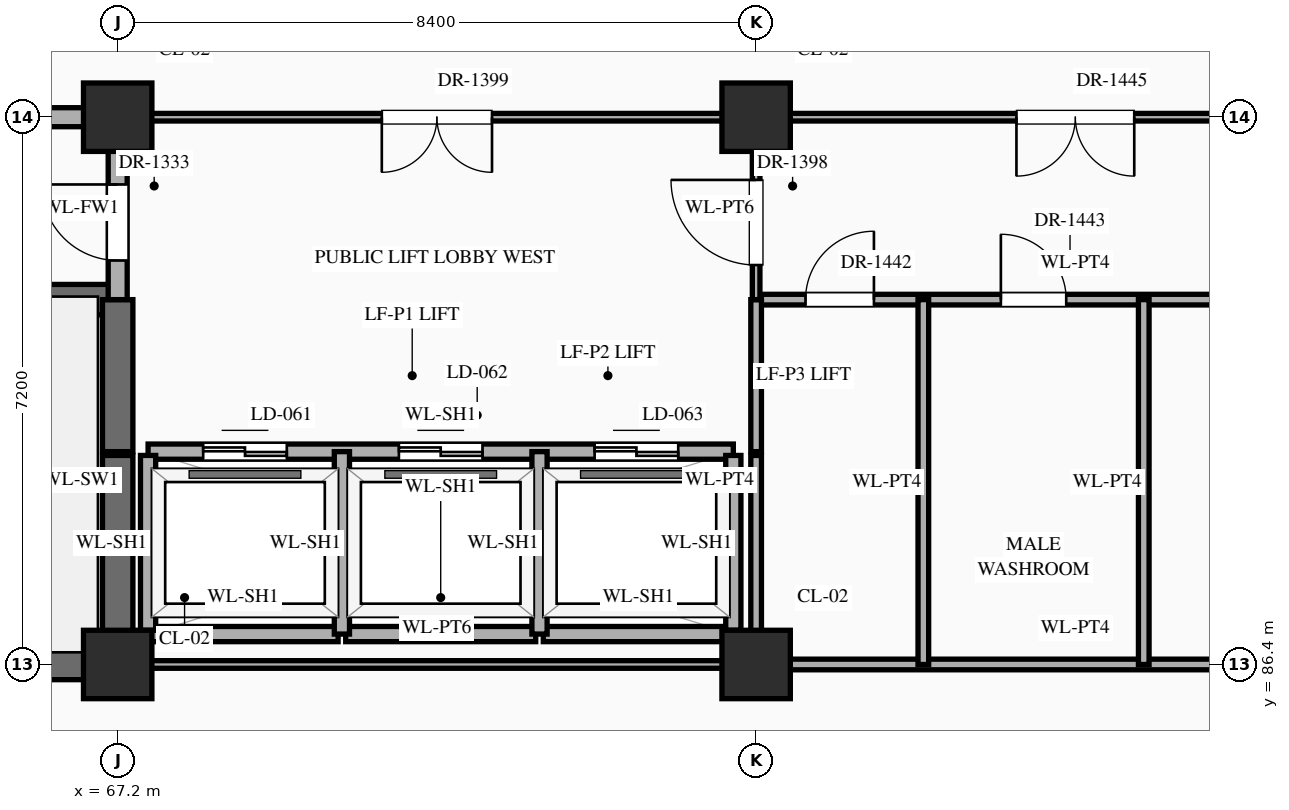
"""IFC4 building model, lengths in metres.
Left out: names, types, materials, properties, quantities, classifications, styles, units other than length and angle.
Written with IfcOpenShell. Run it as: python <this file> out.ifc"""

import sys

from ifc_helpers import new_model, si_unit, direction, frame, frame_2d, origin, origin_2d, place, context, subcontext, project, spatial, rectangle, extrude, element, fill, save


model = new_model("IFC4")
c1 = context("Model", 3, precision=1e-05, world=origin(), true_north=direction((0.0, 1.0)))
c2 = subcontext(c1, "Body", "Model", "MODEL_VIEW")
j1 = project(units=[si_unit("LENGTHUNIT", "METRE"), si_unit("PLANEANGLEUNIT", "RADIAN")], contexts=[c1])
p1 = place(None, origin())
s1 = spatial("IfcSite", under=j1, at=p1, CompositionType="ELEMENT")
p2 = place(p1, origin())
s2 = spatial("IfcBuilding", under=s1, at=p2, CompositionType="ELEMENT")
p3 = place(p2, frame((0.0, 0.0, 10.8)))
s3 = spatial("IfcBuildingStorey", under=s2, at=p3, CompositionType="ELEMENT", Elevation=10.8)
for number, where, z_axis, x_axis in (
    (1, (67.2, 86.4, 0.0), (0.0, 0.0, 1.0), (1.0, 0.0, 0.0)),
    (2, (67.2, 93.6, 0.0), (0.0, 0.0, 1.0), (1.0, 0.0, 0.0)),
    (3, (75.6, 86.4, 0.0), (0.0, 0.0, 1.0), (1.0, 0.0, 0.0)),
    (4, (75.6, 93.6, 0.0), (0.0, 0.0, 1.0), (1.0, 0.0, 0.0)),
):
    element("IfcColumn", number, at=place(p3, frame(where, z_axis=z_axis, x_axis=x_axis)), inside=s3, PredefinedType="COLUMN", context=c2, shape_type="SweptSolid", body=[
        extrude(rectangle(XDim=0.9, YDim=0.9, at=origin_2d()), origin(), (0.0, 0.0, 1.0), 5.4),
    ])
p4 = place(p3, frame((58.8, 86.4, 0.0), z_axis=(0.0, 0.0, 1.0), x_axis=(1.0, 0.0, 0.0)))
e5 = element("IfcWall", 5, at=p4, inside=s3, PredefinedType="SHEAR", context=c2, shape_type="SweptSolid", body=[
    extrude(rectangle(XDim=8.4, YDim=0.4, at=frame_2d((4.2, 0.0))), origin(), (0.0, 0.0, 1.0), 5.12),
])
p5 = place(p3, frame((67.25, 86.4, 0.0), z_axis=(0.0, 0.0, 1.0), x_axis=(1.0, 0.0, 0.0)))
e6 = element("IfcWall", 6, at=p5, inside=s3, PredefinedType="STANDARD", context=c2, shape_type="SweptSolid", body=[
    extrude(rectangle(XDim=8.3, YDim=0.1, at=frame_2d((4.15, 0.0))), origin(), (0.0, 0.0, 1.0), 4.27),
])
p6 = place(p3, frame((75.6, 86.4, 0.0), z_axis=(0.0, 0.0, 1.0), x_axis=(1.0, 0.0, 0.0)))
e7 = element("IfcWall", 7, at=p6, inside=s3, PredefinedType="STANDARD", context=c2, shape_type="SweptSolid", body=[
    extrude(rectangle(XDim=8.4, YDim=0.14, at=frame_2d((4.2, 0.0))), origin(), (0.0, 0.0, 1.0), 4.27),
])
for number, where, z_axis, x_axis in (
    (8, (67.6, 86.8, 0.0), (0.0, 0.0, 1.0), (1.0, 0.0, 0.0)),
    (9, (70.2, 86.8, 0.0), (0.0, 0.0, 1.0), (1.0, 0.0, 0.0)),
    (10, (72.8, 86.8, 0.0), (0.0, 0.0, 1.0), (1.0, 0.0, 0.0)),
):
    element("IfcWall", number, at=place(p3, frame(where, z_axis=z_axis, x_axis=x_axis)), inside=s3, PredefinedType="STANDARD", context=c2, shape_type="SweptSolid", body=[
        extrude(rectangle(XDim=2.5, YDim=0.2, at=frame_2d((1.25, 0.0))), origin(), (0.0, 0.0, 1.0), 5.12),
    ])
p7 = place(p3, frame((67.6, 89.2, 0.0), z_axis=(0.0, 0.0, 1.0), x_axis=(1.0, 0.0, 0.0)))
e11 = element("IfcWall", 11, at=p7, inside=s3, PredefinedType="STANDARD", context=c2, shape_type="SweptSolid", body=[
    extrude(rectangle(XDim=7.7, YDim=0.2, at=frame_2d((3.85, 0.0))), origin(), (0.0, 0.0, 1.0), 5.12),
])
p8 = place(p7, frame((0.725, 0.0, 0.0)))
e12 = element("IfcOpeningElement", 12, at=p8, cuts=e11, PredefinedType="OPENING", context=c2, shape_type="SweptSolid", body=[
    extrude(rectangle(XDim=1.1, YDim=2.15, at=frame_2d((0.55, 1.075))), frame((0.0, 0.112, 0.0), z_axis=(0.0, -1.0, 0.0), x_axis=(1.0, 0.0, 0.0)), (0.0, 0.0, 1.0), 0.224),
])
p9 = place(p7, frame((3.3, 0.0, 0.0)))
e13 = element("IfcOpeningElement", 13, at=p9, cuts=e11, PredefinedType="OPENING", context=c2, shape_type="SweptSolid", body=[
    extrude(rectangle(XDim=1.1, YDim=2.15, at=frame_2d((0.55, 1.075))), frame((0.0, 0.112, 0.0), z_axis=(0.0, -1.0, 0.0), x_axis=(1.0, 0.0, 0.0)), (0.0, 0.0, 1.0), 0.224),
])
p10 = place(p7, frame((5.875, 0.0, 0.0)))
e14 = element("IfcOpeningElement", 14, at=p10, cuts=e11, PredefinedType="OPENING", context=c2, shape_type="SweptSolid", body=[
    extrude(rectangle(XDim=1.1, YDim=2.15, at=frame_2d((0.55, 1.075))), frame((0.0, 0.112, 0.0), z_axis=(0.0, -1.0, 0.0), x_axis=(1.0, 0.0, 0.0)), (0.0, 0.0, 1.0), 0.224),
])
p11 = place(p3, frame((58.8, 91.2, 0.0), z_axis=(0.0, 0.0, 1.0), x_axis=(1.0, 0.0, 0.0)))
e15 = element("IfcWall", 15, at=p11, inside=s3, PredefinedType="SHEAR", context=c2, shape_type="SweptSolid", body=[
    extrude(rectangle(XDim=8.4, YDim=0.4, at=frame_2d((4.2, 0.0))), origin(), (0.0, 0.0, 1.0), 5.12),
])
p12 = place(p11, frame((0.65, 0.0, 0.0)))
e16 = element("IfcOpeningElement", 16, at=p12, cuts=e15, PredefinedType="OPENING", context=c2, shape_type="SweptSolid", body=[
    extrude(rectangle(XDim=1.1, YDim=2.2, at=frame_2d((0.55, 1.1))), frame((0.0, 0.212, 0.0), z_axis=(0.0, -1.0, 0.0), x_axis=(1.0, 0.0, 0.0)), (0.0, 0.0, 1.0), 0.424),
])
p13 = place(p3, frame((75.6, 91.2, 0.0), z_axis=(0.0, 0.0, 1.0), x_axis=(1.0, 0.0, 0.0)))
e17 = element("IfcWall", 17, at=p13, inside=s3, PredefinedType="STANDARD", context=c2, shape_type="SweptSolid", body=[
    extrude(rectangle(XDim=8.4, YDim=0.14, at=frame_2d((4.2, 0.0))), origin(), (0.0, 0.0, 1.0), 5.12),
])
p14 = place(p13, frame((0.65, 0.0, 0.0)))
e18 = element("IfcOpeningElement", 18, at=p14, cuts=e17, PredefinedType="OPENING", context=c2, shape_type="SweptSolid", body=[
    extrude(rectangle(XDim=0.9, YDim=2.15, at=frame_2d((0.45, 1.075))), frame((0.0, 0.082, 0.0), z_axis=(0.0, -1.0, 0.0), x_axis=(1.0, 0.0, 0.0)), (0.0, 0.0, 1.0), 0.164),
])
p15 = place(p13, frame((3.22, 0.0, 0.0)))
e19 = element("IfcOpeningElement", 19, at=p15, cuts=e17, PredefinedType="OPENING", context=c2, shape_type="SweptSolid", body=[
    extrude(rectangle(XDim=0.86, YDim=2.1, at=frame_2d((0.43, 1.05))), frame((0.0, 0.082, 0.0), z_axis=(0.0, -1.0, 0.0), x_axis=(1.0, 0.0, 0.0)), (0.0, 0.0, 1.0), 0.164),
])
p16 = place(p13, frame((6.32, 0.0, 0.0)))
e20 = element("IfcOpeningElement", 20, at=p16, cuts=e17, PredefinedType="OPENING", context=c2, shape_type="SweptSolid", body=[
    extrude(rectangle(XDim=0.86, YDim=2.1, at=frame_2d((0.43, 1.05))), frame((0.0, 0.082, 0.0), z_axis=(0.0, -1.0, 0.0), x_axis=(1.0, 0.0, 0.0)), (0.0, 0.0, 1.0), 0.164),
])
p17 = place(p3, frame((58.8, 93.6, 0.0), z_axis=(0.0, 0.0, 1.0), x_axis=(1.0, 0.0, 0.0)))
e21 = element("IfcWall", 21, at=p17, inside=s3, PredefinedType="STANDARD", context=c2, shape_type="SweptSolid", body=[
    extrude(rectangle(XDim=8.4, YDim=0.25, at=frame_2d((4.2, 0.0))), origin(), (0.0, 0.0, 1.0), 4.27),
])
p18 = place(p17, frame((3.3, 0.0, 0.0)))
e22 = element("IfcOpeningElement", 22, at=p18, cuts=e21, PredefinedType="OPENING", context=c2, shape_type="SweptSolid", body=[
    extrude(rectangle(XDim=1.8, YDim=2.35, at=frame_2d((0.9, 1.175))), frame((0.0, 0.137, 0.0), z_axis=(0.0, -1.0, 0.0), x_axis=(1.0, 0.0, 0.0)), (0.0, 0.0, 1.0), 0.274),
])
p19 = place(p3, frame((67.2, 93.6, 0.0), z_axis=(0.0, 0.0, 1.0), x_axis=(1.0, 0.0, 0.0)))
e23 = element("IfcWall", 23, at=p19, inside=s3, PredefinedType="STANDARD", context=c2, shape_type="SweptSolid", body=[
    extrude(rectangle(XDim=33.6, YDim=0.1, at=frame_2d((16.8, 0.0))), origin(), (0.0, 0.0, 1.0), 4.27),
])
p20 = place(p19, frame((3.475, 0.0, 0.0)))
e24 = element("IfcOpeningElement", 24, at=p20, cuts=e23, PredefinedType="OPENING", context=c2, shape_type="SweptSolid", body=[
    extrude(rectangle(XDim=1.45, YDim=2.3, at=frame_2d((0.725, 1.15))), frame((0.0, 0.062, 0.0), z_axis=(0.0, -1.0, 0.0), x_axis=(1.0, 0.0, 0.0)), (0.0, 0.0, 1.0), 0.124),
])
p21 = place(p19, frame((28.45, 0.0, 0.0)))
e25 = element("IfcOpeningElement", 25, at=p21, cuts=e23, PredefinedType="OPENING", context=c2, shape_type="SweptSolid", body=[
    extrude(rectangle(XDim=1.9, YDim=2.5, at=frame_2d((0.95, 1.25))), frame((0.0, 0.062, 0.0), z_axis=(0.0, -1.0, 0.0), x_axis=(1.0, 0.0, 0.0)), (0.0, 0.0, 1.0), 0.124),
])
p22 = place(p19, frame((11.825, 0.0, 0.0)))
e26 = element("IfcOpeningElement", 26, at=p22, cuts=e23, PredefinedType="OPENING", context=c2, shape_type="SweptSolid", body=[
    extrude(rectangle(XDim=1.55, YDim=2.35, at=frame_2d((0.775, 1.175))), frame((0.0, 0.062, 0.0), z_axis=(0.0, -1.0, 0.0), x_axis=(1.0, 0.0, 0.0)), (0.0, 0.0, 1.0), 0.124),
])
p23 = place(p19, frame((17.785, 0.0, 0.0)))
e27 = element("IfcOpeningElement", 27, at=p23, cuts=e23, PredefinedType="OPENING", context=c2, shape_type="SweptSolid", body=[
    extrude(rectangle(XDim=1.2, YDim=2.35, at=frame_2d((0.6, 1.175))), frame((0.0, 0.062, 0.0), z_axis=(0.0, -1.0, 0.0), x_axis=(1.0, 0.0, 0.0)), (0.0, 0.0, 1.0), 0.124),
])
p24 = place(p19, frame((20.38, 0.0, 0.0)))
e28 = element("IfcOpeningElement", 28, at=p24, cuts=e23, PredefinedType="OPENING", context=c2, shape_type="SweptSolid", body=[
    extrude(rectangle(XDim=1.24, YDim=2.3, at=frame_2d((0.62, 1.15))), frame((0.0, 0.062, 0.0), z_axis=(0.0, -1.0, 0.0), x_axis=(1.0, 0.0, 0.0)), (0.0, 0.0, 1.0), 0.124),
])
p25 = place(p19, frame((22.975, 0.0, 0.0)))
e29 = element("IfcOpeningElement", 29, at=p25, cuts=e23, PredefinedType="OPENING", context=c2, shape_type="SweptSolid", body=[
    extrude(rectangle(XDim=1.28, YDim=2.35, at=frame_2d((0.64, 1.175))), frame((0.0, 0.062, 0.0), z_axis=(0.0, -1.0, 0.0), x_axis=(1.0, 0.0, 0.0)), (0.0, 0.0, 1.0), 0.124),
])
p26 = place(p3, frame((67.2, 86.45, 0.0), z_axis=(0.0, 0.0, 1.0), x_axis=(0.0, 1.0, 0.0)))
e30 = element("IfcWall", 30, at=p26, inside=s3, PredefinedType="SHEAR", context=c2, shape_type="SweptSolid", body=[
    extrude(rectangle(XDim=2.7, YDim=0.4, at=frame_2d((1.35, 0.0))), origin(), (0.0, 0.0, 1.0), 5.12),
])
p27 = place(p3, frame((67.2, 89.2, 0.0), z_axis=(0.0, 0.0, 1.0), x_axis=(0.0, 1.0, 0.0)))
e31 = element("IfcWall", 31, at=p27, inside=s3, PredefinedType="SHEAR", context=c2, shape_type="SweptSolid", body=[
    extrude(rectangle(XDim=2.0, YDim=0.4, at=frame_2d((1.0, 0.0))), origin(), (0.0, 0.0, 1.0), 5.12),
])
p28 = place(p3, frame((67.2, 91.2, 0.0), z_axis=(0.0, 0.0, 1.0), x_axis=(0.0, 1.0, 0.0)))
e32 = element("IfcWall", 32, at=p28, inside=s3, PredefinedType="STANDARD", context=c2, shape_type="SweptSolid", body=[
    extrude(rectangle(XDim=2.4, YDim=0.25, at=frame_2d((1.2, 0.0))), origin(), (0.0, 0.0, 1.0), 4.37),
])
p29 = place(p28, frame((0.515, 0.0, 0.0)))
e33 = element("IfcOpeningElement", 33, at=p29, cuts=e32, PredefinedType="OPENING", context=c2, shape_type="SweptSolid", body=[
    extrude(rectangle(XDim=1.0, YDim=2.2, at=frame_2d((0.5, 1.1))), frame((0.0, 0.137, 0.0), z_axis=(0.0, -1.0, 0.0), x_axis=(1.0, 0.0, 0.0)), (0.0, 0.0, 1.0), 0.274),
])
p30 = place(p3, frame((67.6, 86.85, 0.0), z_axis=(0.0, 0.0, 1.0), x_axis=(0.0, 1.0, 0.0)))
e34 = element("IfcWall", 34, at=p30, inside=s3, PredefinedType="STANDARD", context=c2, shape_type="SweptSolid", body=[
    extrude(rectangle(XDim=2.3, YDim=0.2, at=frame_2d((1.15, 0.0))), origin(), (0.0, 0.0, 1.0), 5.12),
])
for number, where, z_axis, x_axis in (
    (35, (70.15, 86.8, 0.0), (0.0, 0.0, 1.0), (0.0, 1.0, 0.0)),
    (36, (72.75, 86.8, 0.0), (0.0, 0.0, 1.0), (0.0, 1.0, 0.0)),
):
    element("IfcWall", number, at=place(p3, frame(where, z_axis=z_axis, x_axis=x_axis)), inside=s3, PredefinedType="STANDARD", context=c2, shape_type="SweptSolid", body=[
        extrude(rectangle(XDim=2.4, YDim=0.2, at=frame_2d((1.2, 0.0))), origin(), (0.0, 0.0, 1.0), 5.12),
    ])
p31 = place(p3, frame((75.3, 86.85, 0.0), z_axis=(0.0, 0.0, 1.0), x_axis=(0.0, 1.0, 0.0)))
e37 = element("IfcWall", 37, at=p31, inside=s3, PredefinedType="STANDARD", context=c2, shape_type="SweptSolid", body=[
    extrude(rectangle(XDim=2.3, YDim=0.2, at=frame_2d((1.15, 0.0))), origin(), (0.0, 0.0, 1.0), 5.12),
])
p32 = place(p3, frame((75.6, 86.45, 0.0), z_axis=(0.0, 0.0, 1.0), x_axis=(0.0, 1.0, 0.0)))
e38 = element("IfcWall", 38, at=p32, inside=s3, PredefinedType="STANDARD", context=c2, shape_type="SweptSolid", body=[
    extrude(rectangle(XDim=2.7, YDim=0.14, at=frame_2d((1.35, 0.0))), origin(), (0.0, 0.0, 1.0), 4.37),
])
p33 = place(p3, frame((75.6, 89.2, 0.0), z_axis=(0.0, 0.0, 1.0), x_axis=(0.0, 1.0, 0.0)))
e39 = element("IfcWall", 39, at=p33, inside=s3, PredefinedType="STANDARD", context=c2, shape_type="SweptSolid", body=[
    extrude(rectangle(XDim=2.0, YDim=0.14, at=frame_2d((1.0, 0.0))), origin(), (0.0, 0.0, 1.0), 4.37),
])
p34 = place(p3, frame((75.6, 91.2, 0.0), z_axis=(0.0, 0.0, 1.0), x_axis=(0.0, 1.0, 0.0)))
e40 = element("IfcWall", 40, at=p34, inside=s3, PredefinedType="STANDARD", context=c2, shape_type="SweptSolid", body=[
    extrude(rectangle(XDim=2.4, YDim=0.1, at=frame_2d((1.2, 0.0))), origin(), (0.0, 0.0, 1.0), 4.37),
])
p35 = place(p34, frame((0.455, 0.0, 0.0)))
e41 = element("IfcOpeningElement", 41, at=p35, cuts=e40, PredefinedType="OPENING", context=c2, shape_type="SweptSolid", body=[
    extrude(rectangle(XDim=1.12, YDim=2.25, at=frame_2d((0.56, 1.125))), frame((0.0, 0.062, 0.0), z_axis=(0.0, -1.0, 0.0), x_axis=(1.0, 0.0, 0.0)), (0.0, 0.0, 1.0), 0.124),
])
for number, where, z_axis, x_axis in (
    (42, (77.8, 86.4, 0.0), (0.0, 0.0, 1.0), (0.0, 1.0, 0.0)),
    (43, (80.7, 86.4, 0.0), (0.0, 0.0, 1.0), (0.0, 1.0, 0.0)),
):
    element("IfcWall", number, at=place(p3, frame(where, z_axis=z_axis, x_axis=x_axis)), inside=s3, PredefinedType="STANDARD", context=c2, shape_type="SweptSolid", body=[
        extrude(rectangle(XDim=4.8, YDim=0.14, at=frame_2d((2.4, 0.0))), origin(), (0.0, 0.0, 1.0), 5.12),
    ])
p36 = place(p8, origin())
e44 = element("IfcDoor", 44, at=p36, inside=s3, OperationType="DOUBLE_DOOR_SLIDING", PredefinedType="DOOR", context=c2, shape_type="SweptSolid", body=[
    extrude(rectangle(XDim=1.1, YDim=2.15, at=frame_2d((0.55, 1.075))), frame((0.0, 0.025, 0.0), z_axis=(0.0, -1.0, 0.0), x_axis=(1.0, 0.0, 0.0)), (0.0, 0.0, 1.0), 0.05),
])
fill(e12, e44)
p37 = place(p9, origin())
e45 = element("IfcDoor", 45, at=p37, inside=s3, OperationType="DOUBLE_DOOR_SLIDING", PredefinedType="DOOR", context=c2, shape_type="SweptSolid", body=[
    extrude(rectangle(XDim=1.1, YDim=2.15, at=frame_2d((0.55, 1.075))), frame((0.0, 0.025, 0.0), z_axis=(0.0, -1.0, 0.0), x_axis=(1.0, 0.0, 0.0)), (0.0, 0.0, 1.0), 0.05),
])
fill(e13, e45)
p38 = place(p10, origin())
e46 = element("IfcDoor", 46, at=p38, inside=s3, OperationType="DOUBLE_DOOR_SLIDING", PredefinedType="DOOR", context=c2, shape_type="SweptSolid", body=[
    extrude(rectangle(XDim=1.1, YDim=2.15, at=frame_2d((0.55, 1.075))), frame((0.0, 0.025, 0.0), z_axis=(0.0, -1.0, 0.0), x_axis=(1.0, 0.0, 0.0)), (0.0, 0.0, 1.0), 0.05),
])
fill(e14, e46)
p39 = place(p29, origin())
e47 = element("IfcDoor", 47, at=p39, inside=s3, OperationType="SINGLE_SWING_RIGHT", PredefinedType="DOOR", context=c2, shape_type="SweptSolid", body=[
    extrude(rectangle(XDim=1.0, YDim=2.2, at=frame_2d((0.5, 1.1))), frame((0.0, 0.025, 0.0), z_axis=(0.0, -1.0, 0.0), x_axis=(1.0, 0.0, 0.0)), (0.0, 0.0, 1.0), 0.05),
])
fill(e33, e47)
p40 = place(p35, origin())
e48 = element("IfcDoor", 48, at=p40, inside=s3, OperationType="SINGLE_SWING_RIGHT", PredefinedType="DOOR", context=c2, shape_type="SweptSolid", body=[
    extrude(rectangle(XDim=1.12, YDim=2.25, at=frame_2d((0.56, 1.125))), frame((0.0, 0.025, 0.0), z_axis=(0.0, -1.0, 0.0), x_axis=(1.0, 0.0, 0.0)), (0.0, 0.0, 1.0), 0.05),
])
fill(e41, e48)
p41 = place(p20, frame((1.45, 0.0, 0.0), z_axis=(0.0, 0.0, 1.0), x_axis=(-1.0, 0.0, 0.0)))
e49 = element("IfcDoor", 49, at=p41, inside=s3, OperationType="DOUBLE_DOOR_SINGLE_SWING", PredefinedType="DOOR", context=c2, shape_type="SweptSolid", body=[
    extrude(rectangle(XDim=1.45, YDim=2.3, at=frame_2d((0.725, 1.15))), frame((0.0, 0.025, 0.0), z_axis=(0.0, -1.0, 0.0), x_axis=(1.0, 0.0, 0.0)), (0.0, 0.0, 1.0), 0.05),
])
fill(e24, e49)
p42 = place(p14, origin())
e50 = element("IfcDoor", 50, at=p42, inside=s3, OperationType="SINGLE_SWING_RIGHT", PredefinedType="DOOR", context=c2, shape_type="SweptSolid", body=[
    extrude(rectangle(XDim=0.9, YDim=2.15, at=frame_2d((0.45, 1.075))), frame((0.0, 0.025, 0.0), z_axis=(0.0, -1.0, 0.0), x_axis=(1.0, 0.0, 0.0)), (0.0, 0.0, 1.0), 0.05),
])
fill(e18, e50)
p43 = place(p15, origin())
e51 = element("IfcDoor", 51, at=p43, inside=s3, OperationType="SINGLE_SWING_LEFT", PredefinedType="DOOR", context=c2, shape_type="SweptSolid", body=[
    extrude(rectangle(XDim=0.86, YDim=2.1, at=frame_2d((0.43, 1.05))), frame((0.0, 0.025, 0.0), z_axis=(0.0, -1.0, 0.0), x_axis=(1.0, 0.0, 0.0)), (0.0, 0.0, 1.0), 0.05),
])
fill(e19, e51)
p44 = place(p22, frame((1.55, 0.0, 0.0), z_axis=(0.0, 0.0, 1.0), x_axis=(-1.0, 0.0, 0.0)))
e52 = element("IfcDoor", 52, at=p44, inside=s3, OperationType="DOUBLE_DOOR_SINGLE_SWING", PredefinedType="DOOR", context=c2, shape_type="SweptSolid", body=[
    extrude(rectangle(XDim=1.55, YDim=2.35, at=frame_2d((0.775, 1.175))), frame((0.0, 0.025, 0.0), z_axis=(0.0, -1.0, 0.0), x_axis=(1.0, 0.0, 0.0)), (0.0, 0.0, 1.0), 0.05),
])
fill(e26, e52)
save(model, sys.argv[1])
